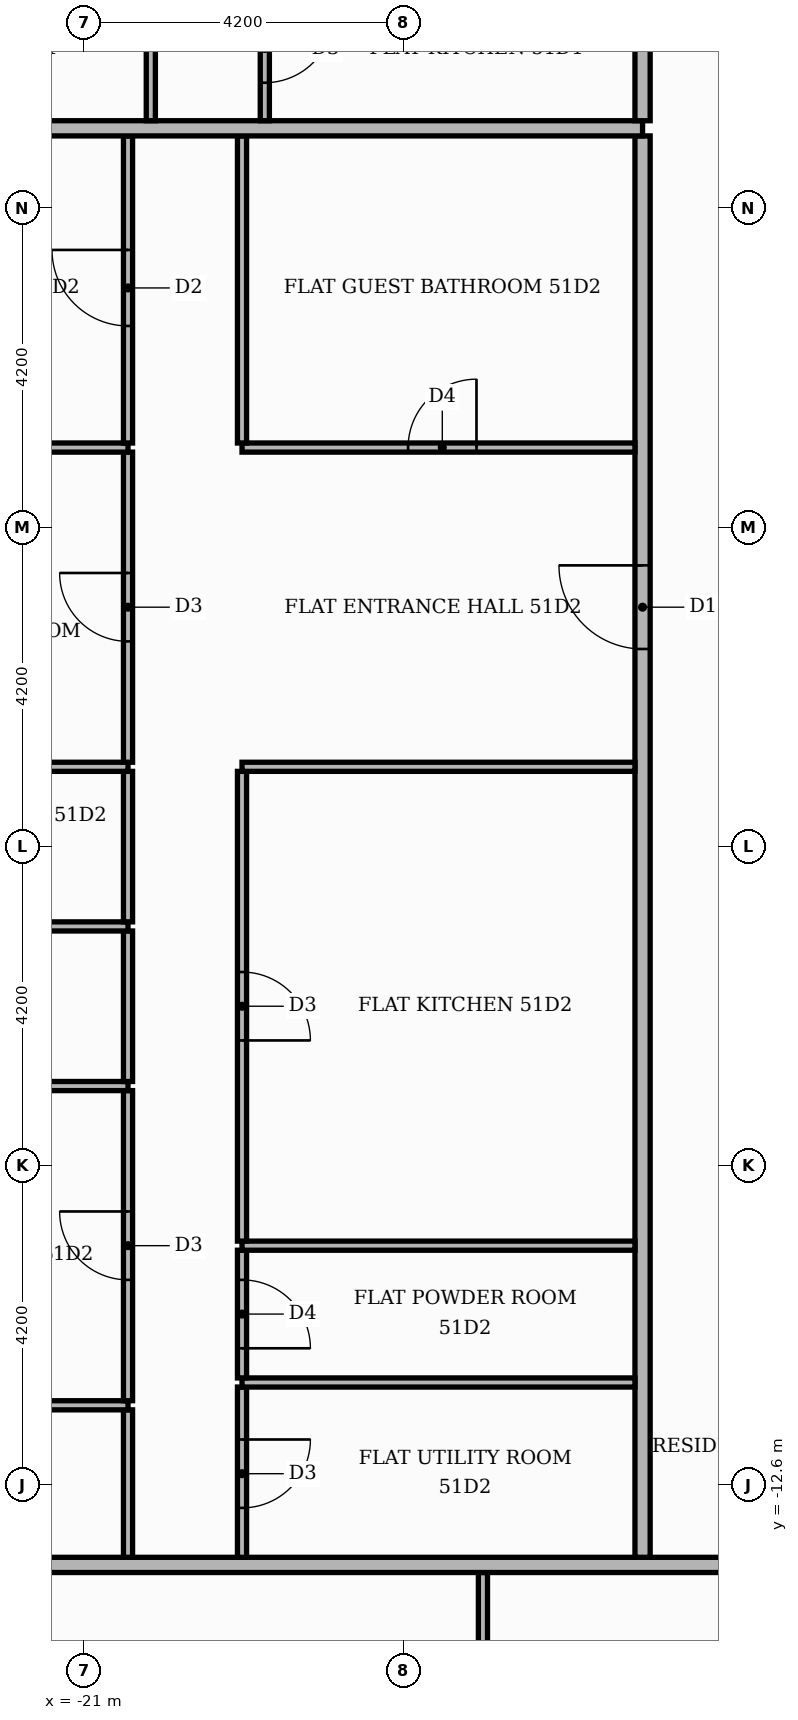
"""IFC4 building model, lengths in metres.
Left out: names, types, materials, properties, quantities, classifications, styles, units other than length and angle.
Written with IfcOpenShell. Run it as: python <this file> out.ifc"""

import sys

from ifc_helpers import new_model, si_unit, direction, frame, frame_2d, origin, place, context, subcontext, project, spatial, rectangle, extrude, element, fill, save


model = new_model("IFC4")
c1 = context("Model", 3, precision=1e-05, world=origin(), true_north=direction((0.0, 1.0)))
c2 = subcontext(c1, "Body", "Model", "MODEL_VIEW")
j1 = project(units=[si_unit("LENGTHUNIT", "METRE"), si_unit("PLANEANGLEUNIT", "RADIAN")], contexts=[c1])
p1 = place(None, origin())
s1 = spatial("IfcSite", under=j1, at=p1, CompositionType="ELEMENT")
p2 = place(p1, origin())
s2 = spatial("IfcBuilding", under=s1, at=p2, CompositionType="ELEMENT")
p3 = place(p2, frame((0.0, 0.0, 215.7)))
s3 = spatial("IfcBuildingStorey", under=s2, at=p3, CompositionType="ELEMENT", Elevation=215.7)
p4 = place(p3, frame((-15.75, -20.36, 0.0), z_axis=(0.0, 0.0, 1.0), x_axis=(0.0, 1.0, 0.0)))
e1 = element("IfcWall", 1, at=p4, inside=s3, PredefinedType="PARTITIONING", context=c2, shape_type="SweptSolid", body=[
    extrude(rectangle(XDim=6.61, YDim=0.12, at=frame_2d((3.305, 0.0))), origin(), (0.0, 0.0, 1.0), 3.48),
])
p5 = place(p4, frame((2.875, 0.0, 0.0)))
e2 = element("IfcOpeningElement", 2, at=p5, cuts=e1, PredefinedType="OPENING", context=c2, shape_type="SweptSolid", body=[
    extrude(rectangle(XDim=0.9, YDim=2.1, at=frame_2d((0.45, 1.05))), frame((0.0, 0.07, 0.0), z_axis=(0.0, -1.0, 0.0), x_axis=(1.0, 0.0, 0.0)), (0.0, 0.0, 1.0), 0.14),
])
p6 = place(p3, frame((-25.42, -13.65, 0.0), z_axis=(0.0, 0.0, 1.0), x_axis=(1.0, 0.0, 0.0)))
e3 = element("IfcWall", 3, at=p6, inside=s3, PredefinedType="PARTITIONING", context=c2, shape_type="SweptSolid", body=[
    extrude(rectangle(XDim=39.07, YDim=0.2, at=frame_2d((19.535, 0.0))), origin(), (0.0, 0.0, 1.0), 3.48),
])
p7 = place(p6, frame((13.32, 0.0, 0.0)))
e4 = element("IfcOpeningElement", 4, at=p7, cuts=e3, PredefinedType="OPENING", context=c2, shape_type="SweptSolid", body=[
    extrude(rectangle(XDim=1.1, YDim=2.4, at=frame_2d((0.55, 1.2))), frame((0.0, 0.11, 0.0), z_axis=(0.0, -1.0, 0.0), x_axis=(1.0, 0.0, 0.0)), (0.0, 0.0, 1.0), 0.22),
])
p8 = place(p3, frame((-20.42, -13.55, 0.0), z_axis=(0.0, 0.0, 1.0), x_axis=(0.0, 1.0, 0.0)))
e5 = element("IfcWall", 5, at=p8, inside=s3, PredefinedType="PARTITIONING", context=c2, shape_type="SweptSolid", body=[
    extrude(rectangle(XDim=1.94, YDim=0.12, at=frame_2d((0.97, 0.0))), origin(), (0.0, 0.0, 1.0), 3.48),
])
p9 = place(p3, frame((-18.92, -13.55, 0.0), z_axis=(0.0, 0.0, 1.0), x_axis=(0.0, 1.0, 0.0)))
e6 = element("IfcWall", 6, at=p9, inside=s3, PredefinedType="PARTITIONING", context=c2, shape_type="SweptSolid", body=[
    extrude(rectangle(XDim=2.24, YDim=0.12, at=frame_2d((1.12, 0.0))), origin(), (0.0, 0.0, 1.0), 3.48),
])
p10 = place(p9, frame((0.65, 0.0, 0.0)))
e7 = element("IfcOpeningElement", 7, at=p10, cuts=e6, PredefinedType="OPENING", context=c2, shape_type="SweptSolid", body=[
    extrude(rectangle(XDim=0.9, YDim=2.1, at=frame_2d((0.45, 1.05))), frame((0.0, 0.07, 0.0), z_axis=(0.0, -1.0, 0.0), x_axis=(1.0, 0.0, 0.0)), (0.0, 0.0, 1.0), 0.14),
])
p11 = place(p3, frame((-13.65, -13.55, 0.0), z_axis=(0.0, 0.0, 1.0), x_axis=(0.0, 1.0, 0.0)))
e8 = element("IfcWall", 8, at=p11, inside=s3, PredefinedType="PARTITIONING", context=c2, shape_type="SweptSolid", body=[
    extrude(rectangle(XDim=18.7, YDim=0.2, at=frame_2d((9.35, 0.0))), origin(), (0.0, 0.0, 1.0), 3.48),
])
p12 = place(p11, frame((11.95, 0.0, 0.0)))
e9 = element("IfcOpeningElement", 9, at=p12, cuts=e8, PredefinedType="OPENING", context=c2, shape_type="SweptSolid", body=[
    extrude(rectangle(XDim=1.1, YDim=2.4, at=frame_2d((0.55, 1.2))), frame((0.0, 0.11, 0.0), z_axis=(0.0, -1.0, 0.0), x_axis=(1.0, 0.0, 0.0)), (0.0, 0.0, 1.0), 0.22),
])
p13 = place(p3, frame((-25.42, -11.55, 0.0), z_axis=(0.0, 0.0, 1.0), x_axis=(1.0, 0.0, 0.0)))
e10 = element("IfcWall", 10, at=p13, inside=s3, PredefinedType="PARTITIONING", context=c2, shape_type="SweptSolid", body=[
    extrude(rectangle(XDim=5.0, YDim=0.12, at=frame_2d((2.5, 0.0))), origin(), (0.0, 0.0, 1.0), 3.48),
])
p14 = place(p13, frame((1.9, 0.0, 0.0)))
e11 = element("IfcOpeningElement", 11, at=p14, cuts=e10, PredefinedType="OPENING", context=c2, shape_type="SweptSolid", body=[
    extrude(rectangle(XDim=0.9, YDim=2.1, at=frame_2d((0.45, 1.05))), frame((0.0, 0.07, 0.0), z_axis=(0.0, -1.0, 0.0), x_axis=(1.0, 0.0, 0.0)), (0.0, 0.0, 1.0), 0.14),
])
p15 = place(p3, frame((-20.42, -11.49, 0.0), z_axis=(0.0, 0.0, 1.0), x_axis=(0.0, 1.0, 0.0)))
e12 = element("IfcWall", 12, at=p15, inside=s3, PredefinedType="PARTITIONING", context=c2, shape_type="SweptSolid", body=[
    extrude(rectangle(XDim=4.08, YDim=0.12, at=frame_2d((2.04, 0.0))), origin(), (0.0, 0.0, 1.0), 3.48),
])
p16 = place(p15, frame((1.59, 0.0, 0.0)))
e13 = element("IfcOpeningElement", 13, at=p16, cuts=e12, PredefinedType="OPENING", context=c2, shape_type="SweptSolid", body=[
    extrude(rectangle(XDim=0.9, YDim=2.1, at=frame_2d((0.45, 1.05))), frame((0.0, 0.07, 0.0), z_axis=(0.0, -1.0, 0.0), x_axis=(1.0, 0.0, 0.0)), (0.0, 0.0, 1.0), 0.14),
])
p17 = place(p3, frame((-18.92, -11.25, 0.0), z_axis=(0.0, 0.0, 1.0), x_axis=(1.0, 0.0, 0.0)))
e14 = element("IfcWall", 14, at=p17, inside=s3, PredefinedType="PARTITIONING", context=c2, shape_type="SweptSolid", body=[
    extrude(rectangle(XDim=5.17, YDim=0.12, at=frame_2d((2.585, 0.0))), origin(), (0.0, 0.0, 1.0), 3.48),
])
p18 = place(p3, frame((-18.92, -11.19, 0.0), z_axis=(0.0, 0.0, 1.0), x_axis=(0.0, 1.0, 0.0)))
e15 = element("IfcWall", 15, at=p18, inside=s3, PredefinedType="PARTITIONING", context=c2, shape_type="SweptSolid", body=[
    extrude(rectangle(XDim=1.68, YDim=0.12, at=frame_2d((0.84, 0.0))), origin(), (0.0, 0.0, 1.0), 3.48),
])
p19 = place(p18, frame((0.39, 0.0, 0.0)))
e16 = element("IfcOpeningElement", 16, at=p19, cuts=e15, PredefinedType="OPENING", context=c2, shape_type="SweptSolid", body=[
    extrude(rectangle(XDim=0.9, YDim=2.1, at=frame_2d((0.45, 1.05))), frame((0.0, 0.07, 0.0), z_axis=(0.0, -1.0, 0.0), x_axis=(1.0, 0.0, 0.0)), (0.0, 0.0, 1.0), 0.14),
])
p20 = place(p3, frame((-18.92, -9.45, 0.0), z_axis=(0.0, 0.0, 1.0), x_axis=(1.0, 0.0, 0.0)))
e17 = element("IfcWall", 17, at=p20, inside=s3, PredefinedType="PARTITIONING", context=c2, shape_type="SweptSolid", body=[
    extrude(rectangle(XDim=5.17, YDim=0.12, at=frame_2d((2.585, 0.0))), origin(), (0.0, 0.0, 1.0), 3.48),
])
p21 = place(p3, frame((-18.92, -9.39, 0.0), z_axis=(0.0, 0.0, 1.0), x_axis=(0.0, 1.0, 0.0)))
e18 = element("IfcWall", 18, at=p21, inside=s3, PredefinedType="PARTITIONING", context=c2, shape_type="SweptSolid", body=[
    extrude(rectangle(XDim=6.18, YDim=0.12, at=frame_2d((3.09, 0.0))), origin(), (0.0, 0.0, 1.0), 3.48),
])
p22 = place(p21, frame((2.64, 0.0, 0.0)))
e19 = element("IfcOpeningElement", 19, at=p22, cuts=e18, PredefinedType="OPENING", context=c2, shape_type="SweptSolid", body=[
    extrude(rectangle(XDim=0.9, YDim=2.1, at=frame_2d((0.45, 1.05))), frame((0.0, 0.07, 0.0), z_axis=(0.0, -1.0, 0.0), x_axis=(1.0, 0.0, 0.0)), (0.0, 0.0, 1.0), 0.14),
])
p23 = place(p3, frame((-25.42, -7.35, 0.0), z_axis=(0.0, 0.0, 1.0), x_axis=(1.0, 0.0, 0.0)))
e20 = element("IfcWall", 20, at=p23, inside=s3, PredefinedType="PARTITIONING", context=c2, shape_type="SweptSolid", body=[
    extrude(rectangle(XDim=5.0, YDim=0.12, at=frame_2d((2.5, 0.0))), origin(), (0.0, 0.0, 1.0), 3.48),
])
p24 = place(p3, frame((-20.42, -7.29, 0.0), z_axis=(0.0, 0.0, 1.0), x_axis=(0.0, 1.0, 0.0)))
e21 = element("IfcWall", 21, at=p24, inside=s3, PredefinedType="PARTITIONING", context=c2, shape_type="SweptSolid", body=[
    extrude(rectangle(XDim=1.98, YDim=0.12, at=frame_2d((0.99, 0.0))), origin(), (0.0, 0.0, 1.0), 3.48),
])
p25 = place(p3, frame((-25.42, -5.25, 0.0), z_axis=(0.0, 0.0, 1.0), x_axis=(1.0, 0.0, 0.0)))
e22 = element("IfcWall", 22, at=p25, inside=s3, PredefinedType="PARTITIONING", context=c2, shape_type="SweptSolid", body=[
    extrude(rectangle(XDim=5.0, YDim=0.12, at=frame_2d((2.5, 0.0))), origin(), (0.0, 0.0, 1.0), 3.48),
])
p26 = place(p25, frame((1.9, 0.0, 0.0)))
e23 = element("IfcOpeningElement", 23, at=p26, cuts=e22, PredefinedType="OPENING", context=c2, shape_type="SweptSolid", body=[
    extrude(rectangle(XDim=0.9, YDim=2.1, at=frame_2d((0.45, 1.05))), frame((0.0, 0.07, 0.0), z_axis=(0.0, -1.0, 0.0), x_axis=(1.0, 0.0, 0.0)), (0.0, 0.0, 1.0), 0.14),
])
p27 = place(p3, frame((-20.42, -5.19, 0.0), z_axis=(0.0, 0.0, 1.0), x_axis=(0.0, 1.0, 0.0)))
e24 = element("IfcWall", 24, at=p27, inside=s3, PredefinedType="PARTITIONING", context=c2, shape_type="SweptSolid", body=[
    extrude(rectangle(XDim=1.98, YDim=0.12, at=frame_2d((0.99, 0.0))), origin(), (0.0, 0.0, 1.0), 3.48),
])
p28 = place(p3, frame((-25.42, -3.15, 0.0), z_axis=(0.0, 0.0, 1.0), x_axis=(1.0, 0.0, 0.0)))
e25 = element("IfcWall", 25, at=p28, inside=s3, PredefinedType="PARTITIONING", context=c2, shape_type="SweptSolid", body=[
    extrude(rectangle(XDim=5.0, YDim=0.12, at=frame_2d((2.5, 0.0))), origin(), (0.0, 0.0, 1.0), 3.48),
])
p29 = place(p28, frame((1.9, 0.0, 0.0)))
e26 = element("IfcOpeningElement", 26, at=p29, cuts=e25, PredefinedType="OPENING", context=c2, shape_type="SweptSolid", body=[
    extrude(rectangle(XDim=0.9, YDim=2.1, at=frame_2d((0.45, 1.05))), frame((0.0, 0.07, 0.0), z_axis=(0.0, -1.0, 0.0), x_axis=(1.0, 0.0, 0.0)), (0.0, 0.0, 1.0), 0.14),
])
p30 = place(p3, frame((-18.92, -3.15, 0.0), z_axis=(0.0, 0.0, 1.0), x_axis=(1.0, 0.0, 0.0)))
e27 = element("IfcWall", 27, at=p30, inside=s3, PredefinedType="PARTITIONING", context=c2, shape_type="SweptSolid", body=[
    extrude(rectangle(XDim=5.17, YDim=0.12, at=frame_2d((2.585, 0.0))), origin(), (0.0, 0.0, 1.0), 3.48),
])
p31 = place(p3, frame((-20.42, -3.09, 0.0), z_axis=(0.0, 0.0, 1.0), x_axis=(0.0, 1.0, 0.0)))
e28 = element("IfcWall", 28, at=p31, inside=s3, PredefinedType="PARTITIONING", context=c2, shape_type="SweptSolid", body=[
    extrude(rectangle(XDim=4.08, YDim=0.12, at=frame_2d((2.04, 0.0))), origin(), (0.0, 0.0, 1.0), 3.48),
])
p32 = place(p31, frame((1.59, 0.0, 0.0)))
e29 = element("IfcOpeningElement", 29, at=p32, cuts=e28, PredefinedType="OPENING", context=c2, shape_type="SweptSolid", body=[
    extrude(rectangle(XDim=0.9, YDim=2.1, at=frame_2d((0.45, 1.05))), frame((0.0, 0.07, 0.0), z_axis=(0.0, -1.0, 0.0), x_axis=(1.0, 0.0, 0.0)), (0.0, 0.0, 1.0), 0.14),
])
p33 = place(p3, frame((-25.42, 1.05, 0.0), z_axis=(0.0, 0.0, 1.0), x_axis=(1.0, 0.0, 0.0)))
e30 = element("IfcWall", 30, at=p33, inside=s3, PredefinedType="PARTITIONING", context=c2, shape_type="SweptSolid", body=[
    extrude(rectangle(XDim=5.0, YDim=0.12, at=frame_2d((2.5, 0.0))), origin(), (0.0, 0.0, 1.0), 3.48),
])
p34 = place(p3, frame((-18.92, 1.05, 0.0), z_axis=(0.0, 0.0, 1.0), x_axis=(1.0, 0.0, 0.0)))
e31 = element("IfcWall", 31, at=p34, inside=s3, PredefinedType="PARTITIONING", context=c2, shape_type="SweptSolid", body=[
    extrude(rectangle(XDim=5.17, YDim=0.12, at=frame_2d((2.585, 0.0))), origin(), (0.0, 0.0, 1.0), 3.48),
])
p35 = place(p34, frame((2.185, 0.0, 0.0)))
e32 = element("IfcOpeningElement", 32, at=p35, cuts=e31, PredefinedType="OPENING", context=c2, shape_type="SweptSolid", body=[
    extrude(rectangle(XDim=0.9, YDim=2.1, at=frame_2d((0.45, 1.05))), frame((0.0, 0.07, 0.0), z_axis=(0.0, -1.0, 0.0), x_axis=(1.0, 0.0, 0.0)), (0.0, 0.0, 1.0), 0.14),
])
p36 = place(p3, frame((-20.42, 1.11, 0.0), z_axis=(0.0, 0.0, 1.0), x_axis=(0.0, 1.0, 0.0)))
e33 = element("IfcWall", 33, at=p36, inside=s3, PredefinedType="PARTITIONING", context=c2, shape_type="SweptSolid", body=[
    extrude(rectangle(XDim=4.04, YDim=0.12, at=frame_2d((2.02, 0.0))), origin(), (0.0, 0.0, 1.0), 3.48),
])
p37 = place(p36, frame((1.54, 0.0, 0.0)))
e34 = element("IfcOpeningElement", 34, at=p37, cuts=e33, PredefinedType="OPENING", context=c2, shape_type="SweptSolid", body=[
    extrude(rectangle(XDim=1.0, YDim=2.1, at=frame_2d((0.5, 1.05))), frame((0.0, 0.07, 0.0), z_axis=(0.0, -1.0, 0.0), x_axis=(1.0, 0.0, 0.0)), (0.0, 0.0, 1.0), 0.14),
])
p38 = place(p3, frame((-18.92, 1.11, 0.0), z_axis=(0.0, 0.0, 1.0), x_axis=(0.0, 1.0, 0.0)))
e35 = element("IfcWall", 35, at=p38, inside=s3, PredefinedType="PARTITIONING", context=c2, shape_type="SweptSolid", body=[
    extrude(rectangle(XDim=4.04, YDim=0.12, at=frame_2d((2.02, 0.0))), origin(), (0.0, 0.0, 1.0), 3.48),
])
p39 = place(p3, frame((-25.42, 5.25, 0.0), z_axis=(0.0, 0.0, 1.0), x_axis=(1.0, 0.0, 0.0)))
e36 = element("IfcWall", 36, at=p39, inside=s3, PredefinedType="PARTITIONING", context=c2, shape_type="SweptSolid", body=[
    extrude(rectangle(XDim=11.77, YDim=0.2, at=frame_2d((5.885, 0.0))), origin(), (0.0, 0.0, 1.0), 3.48),
])
p40 = place(p3, frame((-20.12, 5.35, 0.0), z_axis=(0.0, 0.0, 1.0), x_axis=(0.0, 1.0, 0.0)))
e37 = element("IfcWall", 37, at=p40, inside=s3, PredefinedType="PARTITIONING", context=c2, shape_type="SweptSolid", body=[
    extrude(rectangle(XDim=1.94, YDim=0.12, at=frame_2d((0.97, 0.0))), origin(), (0.0, 0.0, 1.0), 3.48),
])
p41 = place(p3, frame((-18.62, 5.35, 0.0), z_axis=(0.0, 0.0, 1.0), x_axis=(0.0, 1.0, 0.0)))
e38 = element("IfcWall", 38, at=p41, inside=s3, PredefinedType="PARTITIONING", context=c2, shape_type="SweptSolid", body=[
    extrude(rectangle(XDim=1.94, YDim=0.12, at=frame_2d((0.97, 0.0))), origin(), (0.0, 0.0, 1.0), 3.48),
])
p42 = place(p41, frame((0.5, 0.0, 0.0)))
e39 = element("IfcOpeningElement", 39, at=p42, cuts=e38, PredefinedType="OPENING", context=c2, shape_type="SweptSolid", body=[
    extrude(rectangle(XDim=0.9, YDim=2.1, at=frame_2d((0.45, 1.05))), frame((0.0, 0.07, 0.0), z_axis=(0.0, -1.0, 0.0), x_axis=(1.0, 0.0, 0.0)), (0.0, 0.0, 1.0), 0.14),
])
p43 = place(p3, frame((-13.65, 5.35, 0.0), z_axis=(0.0, 0.0, 1.0), x_axis=(0.0, 1.0, 0.0)))
e40 = element("IfcWall", 40, at=p43, inside=s3, PredefinedType="PARTITIONING", context=c2, shape_type="SweptSolid", body=[
    extrude(rectangle(XDim=8.2, YDim=0.2, at=frame_2d((4.1, 0.0))), origin(), (0.0, 0.0, 1.0), 3.48),
])
p44 = place(p43, frame((5.65, 0.0, 0.0)))
e41 = element("IfcOpeningElement", 41, at=p44, cuts=e40, PredefinedType="OPENING", context=c2, shape_type="SweptSolid", body=[
    extrude(rectangle(XDim=1.1, YDim=2.4, at=frame_2d((0.55, 1.2))), frame((0.0, 0.11, 0.0), z_axis=(0.0, -1.0, 0.0), x_axis=(1.0, 0.0, 0.0)), (0.0, 0.0, 1.0), 0.22),
])
p45 = place(p42, frame((0.9, 0.0, 0.0), z_axis=(0.0, 0.0, 1.0), x_axis=(-1.0, 0.0, 0.0)))
e42 = element("IfcDoor", 42, at=p45, inside=s3, OperationType="SINGLE_SWING_RIGHT", PredefinedType="DOOR", context=c2, shape_type="SweptSolid", body=[
    extrude(rectangle(XDim=0.9, YDim=2.1, at=frame_2d((0.45, 1.05))), frame((0.0, 0.025, 0.0), z_axis=(0.0, -1.0, 0.0), x_axis=(1.0, 0.0, 0.0)), (0.0, 0.0, 1.0), 0.05),
])
fill(e39, e42)
p46 = place(p12, origin())
e43 = element("IfcDoor", 43, at=p46, inside=s3, OperationType="SINGLE_SWING_RIGHT", PredefinedType="DOOR", context=c2, shape_type="SweptSolid", body=[
    extrude(rectangle(XDim=1.1, YDim=2.4, at=frame_2d((0.55, 1.2))), frame((0.0, 0.025, 0.0), z_axis=(0.0, -1.0, 0.0), x_axis=(1.0, 0.0, 0.0)), (0.0, 0.0, 1.0), 0.05),
])
fill(e9, e43)
p47 = place(p35, origin())
e44 = element("IfcDoor", 44, at=p47, inside=s3, OperationType="SINGLE_SWING_RIGHT", PredefinedType="DOOR", context=c2, shape_type="SweptSolid", body=[
    extrude(rectangle(XDim=0.9, YDim=2.1, at=frame_2d((0.45, 1.05))), frame((0.0, 0.025, 0.0), z_axis=(0.0, -1.0, 0.0), x_axis=(1.0, 0.0, 0.0)), (0.0, 0.0, 1.0), 0.05),
])
fill(e32, e44)
p48 = place(p22, frame((0.9, 0.0, 0.0), z_axis=(0.0, 0.0, 1.0), x_axis=(-1.0, 0.0, 0.0)))
e45 = element("IfcDoor", 45, at=p48, inside=s3, OperationType="SINGLE_SWING_LEFT", PredefinedType="DOOR", context=c2, shape_type="SweptSolid", body=[
    extrude(rectangle(XDim=0.9, YDim=2.1, at=frame_2d((0.45, 1.05))), frame((0.0, 0.025, 0.0), z_axis=(0.0, -1.0, 0.0), x_axis=(1.0, 0.0, 0.0)), (0.0, 0.0, 1.0), 0.05),
])
fill(e19, e45)
p49 = place(p19, frame((0.9, 0.0, 0.0), z_axis=(0.0, 0.0, 1.0), x_axis=(-1.0, 0.0, 0.0)))
e46 = element("IfcDoor", 46, at=p49, inside=s3, OperationType="SINGLE_SWING_LEFT", PredefinedType="DOOR", context=c2, shape_type="SweptSolid", body=[
    extrude(rectangle(XDim=0.9, YDim=2.1, at=frame_2d((0.45, 1.05))), frame((0.0, 0.025, 0.0), z_axis=(0.0, -1.0, 0.0), x_axis=(1.0, 0.0, 0.0)), (0.0, 0.0, 1.0), 0.05),
])
fill(e16, e46)
p50 = place(p10, frame((0.9, 0.0, 0.0), z_axis=(0.0, 0.0, 1.0), x_axis=(-1.0, 0.0, 0.0)))
e47 = element("IfcDoor", 47, at=p50, inside=s3, OperationType="SINGLE_SWING_RIGHT", PredefinedType="DOOR", context=c2, shape_type="SweptSolid", body=[
    extrude(rectangle(XDim=0.9, YDim=2.1, at=frame_2d((0.45, 1.05))), frame((0.0, 0.025, 0.0), z_axis=(0.0, -1.0, 0.0), x_axis=(1.0, 0.0, 0.0)), (0.0, 0.0, 1.0), 0.05),
])
fill(e7, e47)
p51 = place(p37, origin())
e48 = element("IfcDoor", 48, at=p51, inside=s3, OperationType="SINGLE_SWING_RIGHT", PredefinedType="DOOR", context=c2, shape_type="SweptSolid", body=[
    extrude(rectangle(XDim=1.0, YDim=2.1, at=frame_2d((0.5, 1.05))), frame((0.0, 0.025, 0.0), z_axis=(0.0, -1.0, 0.0), x_axis=(1.0, 0.0, 0.0)), (0.0, 0.0, 1.0), 0.05),
])
fill(e34, e48)
p52 = place(p32, origin())
e49 = element("IfcDoor", 49, at=p52, inside=s3, OperationType="SINGLE_SWING_RIGHT", PredefinedType="DOOR", context=c2, shape_type="SweptSolid", body=[
    extrude(rectangle(XDim=0.9, YDim=2.1, at=frame_2d((0.45, 1.05))), frame((0.0, 0.025, 0.0), z_axis=(0.0, -1.0, 0.0), x_axis=(1.0, 0.0, 0.0)), (0.0, 0.0, 1.0), 0.05),
])
fill(e29, e49)
p53 = place(p16, origin())
e50 = element("IfcDoor", 50, at=p53, inside=s3, OperationType="SINGLE_SWING_RIGHT", PredefinedType="DOOR", context=c2, shape_type="SweptSolid", body=[
    extrude(rectangle(XDim=0.9, YDim=2.1, at=frame_2d((0.45, 1.05))), frame((0.0, 0.025, 0.0), z_axis=(0.0, -1.0, 0.0), x_axis=(1.0, 0.0, 0.0)), (0.0, 0.0, 1.0), 0.05),
])
fill(e13, e50)
save(model, sys.argv[1])
